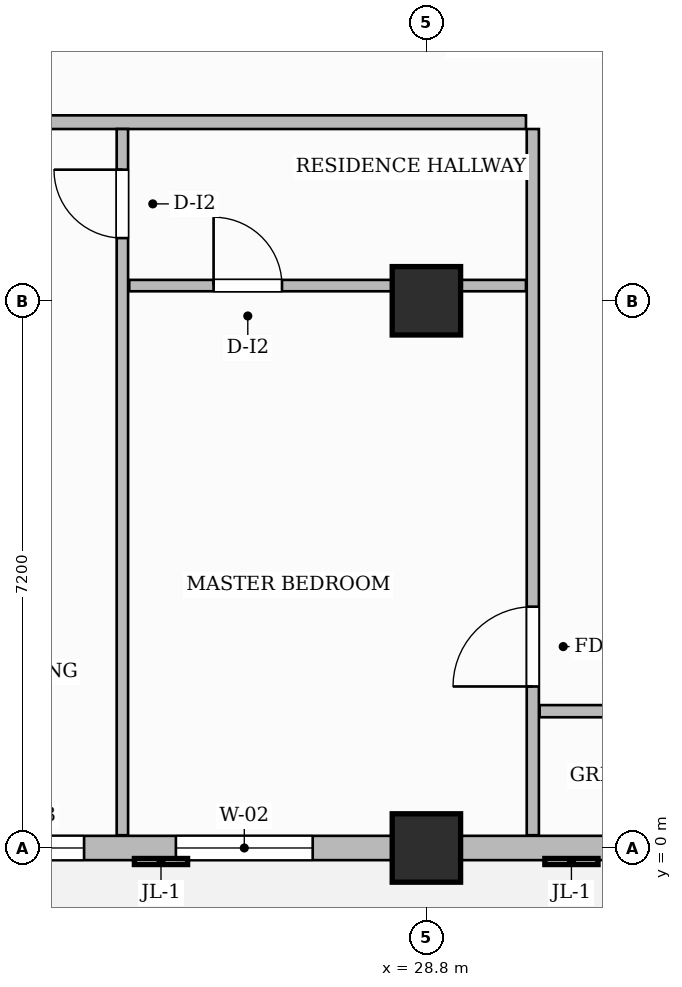
"""IFC4 building model, lengths in metres.
Left out: names, types, materials, properties, quantities, classifications, styles, units other than length and angle.
Written with IfcOpenShell. Run it as: python <this file> out.ifc"""

import sys

from ifc_helpers import new_model, si_unit, direction, frame, frame_2d, origin, origin_2d, place, context, subcontext, project, spatial, rectangle, extrude, source, transform, mapped, element, fill, save


model = new_model("IFC4")
c1 = context("Model", 3, precision=1e-05, world=origin(), true_north=direction((0.0, 1.0)))
c2 = subcontext(c1, "Body", "Model", "MODEL_VIEW")
j1 = project(units=[si_unit("LENGTHUNIT", "METRE"), si_unit("PLANEANGLEUNIT", "RADIAN")], contexts=[c1])
p1 = place(None, origin())
s1 = spatial("IfcSite", under=j1, at=p1, CompositionType="ELEMENT")
p2 = place(p1, origin())
s2 = spatial("IfcBuilding", under=s1, at=p2, CompositionType="ELEMENT")
p3 = place(p2, frame((0.0, 0.0, 248.1)))
s3 = spatial("IfcBuildingStorey", under=s2, at=p3, CompositionType="ELEMENT", Elevation=248.1)
m1 = source(origin(), c2, "Body", "SweptSolid", [
    extrude(rectangle(XDim=0.9, YDim=0.9, at=origin_2d()), origin(), (0.0, 0.0, 1.0), 3.85),
])
for number, where, z_axis, x_axis in (
    (1, (28.8, 0.0, 0.0), (0.0, 0.0, 1.0), (1.0, 0.0, 0.0)),
    (2, (28.8, 7.2, 0.0), (0.0, 0.0, 1.0), (1.0, 0.0, 0.0)),
):
    element("IfcColumn", number, at=place(p3, frame(where, z_axis=z_axis, x_axis=x_axis)), inside=s3, PredefinedType="COLUMN", context=c2, shape_type="MappedRepresentation", body=[
        mapped(m1, transform((0.0, 0.0, 0.0), scale=1.0)),
    ])
p4 = place(p3, frame((14.568, 9.55, 0.0), z_axis=(0.0, 0.0, 1.0), x_axis=(1.0, 0.0, 0.0)))
e3 = element("IfcWall", 3, at=p4, inside=s3, PredefinedType="PARTITIONING", context=c2, shape_type="SweptSolid", body=[
    extrude(rectangle(XDim=15.542, YDim=0.18, at=frame_2d((7.771, 0.0))), origin(), (0.0, 0.0, 1.0), 3.6),
])
p5 = place(p4, frame((2.888, 0.0, 0.0)))
e4 = element("IfcOpeningElement", 4, at=p5, cuts=e3, PredefinedType="OPENING", context=c2, shape_type="SweptSolid", body=[
    extrude(rectangle(XDim=1.0, YDim=2.2, at=frame_2d((0.5, 1.1))), frame((0.0, 0.1, 0.0), z_axis=(0.0, -1.0, 0.0), x_axis=(1.0, 0.0, 0.0)), (0.0, 0.0, 1.0), 0.2),
])
p6 = place(p4, frame((8.212, 0.0, 0.0)))
e5 = element("IfcOpeningElement", 5, at=p6, cuts=e3, PredefinedType="OPENING", context=c2, shape_type="SweptSolid", body=[
    extrude(rectangle(XDim=1.05, YDim=2.25, at=frame_2d((0.525, 1.125))), frame((0.0, 0.1, 0.0), z_axis=(0.0, -1.0, 0.0), x_axis=(1.0, 0.0, 0.0)), (0.0, 0.0, 1.0), 0.2),
])
p7 = place(p3, frame((30.2, 0.168, 0.0), z_axis=(0.0, 0.0, 1.0), x_axis=(0.0, 1.0, 0.0)))
e6 = element("IfcWall", 6, at=p7, inside=s3, PredefinedType="PARTITIONING", context=c2, shape_type="SweptSolid", body=[
    extrude(rectangle(XDim=9.292, YDim=0.16, at=frame_2d((4.646, 0.0))), origin(), (0.0, 0.0, 1.0), 3.6),
])
p8 = place(p7, frame((1.957, 0.0, 0.0)))
e7 = element("IfcOpeningElement", 7, at=p8, cuts=e6, PredefinedType="OPENING", context=c2, shape_type="SweptSolid", body=[
    extrude(rectangle(XDim=1.05, YDim=2.15, at=frame_2d((0.525, 1.075))), frame((0.0, 0.09, 0.0), z_axis=(0.0, -1.0, 0.0), x_axis=(1.0, 0.0, 0.0)), (0.0, 0.0, 1.0), 0.18),
])
p9 = place(p3, frame((30.29, 1.8, 0.0), z_axis=(0.0, 0.0, 1.0), x_axis=(1.0, 0.0, 0.0)))
e8 = element("IfcWall", 8, at=p9, inside=s3, PredefinedType="PARTITIONING", context=c2, shape_type="SweptSolid", body=[
    extrude(rectangle(XDim=19.37, YDim=0.16, at=frame_2d((9.685, 0.0))), origin(), (0.0, 0.0, 1.0), 3.6),
])
p10 = place(p9, frame((9.735, 0.0, 0.0)))
e9 = element("IfcOpeningElement", 9, at=p10, cuts=e8, PredefinedType="OPENING", context=c2, shape_type="SweptSolid", body=[
    extrude(rectangle(XDim=0.95, YDim=2.15, at=frame_2d((0.475, 1.075))), frame((0.0, 0.09, 0.0), z_axis=(0.0, -1.0, 0.0), x_axis=(1.0, 0.0, 0.0)), (0.0, 0.0, 1.0), 0.18),
])
p11 = place(p3, frame((24.8, 0.168, 0.0), z_axis=(0.0, 0.0, 1.0), x_axis=(0.0, 1.0, 0.0)))
e10 = element("IfcWall", 10, at=p11, inside=s3, PredefinedType="PARTITIONING", context=c2, shape_type="SweptSolid", body=[
    extrude(rectangle(XDim=9.292, YDim=0.15, at=frame_2d((4.646, 0.0))), origin(), (0.0, 0.0, 1.0), 3.6),
])
p12 = place(p11, frame((7.857, 0.0, 0.0)))
e11 = element("IfcOpeningElement", 11, at=p12, cuts=e10, PredefinedType="OPENING", context=c2, shape_type="SweptSolid", body=[
    extrude(rectangle(XDim=0.9, YDim=2.15, at=frame_2d((0.45, 1.075))), frame((0.0, 0.085, 0.0), z_axis=(0.0, -1.0, 0.0), x_axis=(1.0, 0.0, 0.0)), (0.0, 0.0, 1.0), 0.17),
])
p13 = place(p3, frame((24.89, 7.4, 0.0), z_axis=(0.0, 0.0, 1.0), x_axis=(1.0, 0.0, 0.0)))
e12 = element("IfcWall", 12, at=p13, inside=s3, PredefinedType="PARTITIONING", context=c2, shape_type="SweptSolid", body=[
    extrude(rectangle(XDim=5.22, YDim=0.15, at=frame_2d((2.61, 0.0))), origin(), (0.0, 0.0, 1.0), 3.135),
])
p14 = place(p13, frame((1.11, 0.0, 0.0)))
e13 = element("IfcOpeningElement", 13, at=p14, cuts=e12, PredefinedType="OPENING", context=c2, shape_type="SweptSolid", body=[
    extrude(rectangle(XDim=0.9, YDim=2.15, at=frame_2d((0.45, 1.075))), frame((0.0, 0.085, 0.0), z_axis=(0.0, -1.0, 0.0), x_axis=(1.0, 0.0, 0.0)), (0.0, 0.0, 1.0), 0.17),
])
p15 = place(p3, frame((14.4, 0.0, 0.0), z_axis=(0.0, 0.0, 1.0), x_axis=(1.0, 0.0, 0.0)))
e14 = element("IfcWall", 14, at=p15, inside=s3, PredefinedType="SOLIDWALL", context=c2, shape_type="SweptSolid", body=[
    extrude(rectangle(XDim=35.4, YDim=0.32, at=frame_2d((17.7, 0.0))), origin(), (0.0, 0.0, 1.0), 3.135),
])
p16 = place(p15, frame((0.85, 0.0, 0.0)))
e15 = element("IfcOpeningElement", 15, at=p16, cuts=e14, PredefinedType="OPENING", context=c2, shape_type="SweptSolid", body=[
    extrude(rectangle(XDim=1.2, YDim=2.2, at=frame_2d((0.6, 1.1))), frame((0.0, 0.17, 0.0), z_axis=(0.0, -1.0, 0.0), x_axis=(1.0, 0.0, 0.0)), (0.0, 0.0, 1.0), 0.34),
])
p17 = place(p15, frame((2.811, 0.0, 0.8)))
e16 = element("IfcOpeningElement", 16, at=p17, cuts=e14, PredefinedType="OPENING", context=c2, shape_type="SweptSolid", body=[
    extrude(rectangle(XDim=1.8, YDim=1.85, at=frame_2d((0.9, 0.925))), frame((0.0, 0.17, 0.0), z_axis=(0.0, -1.0, 0.0), x_axis=(1.0, 0.0, 0.0)), (0.0, 0.0, 1.0), 0.34),
])
p18 = place(p15, frame((5.269, 0.0, 0.8)))
e17 = element("IfcOpeningElement", 17, at=p18, cuts=e14, PredefinedType="OPENING", context=c2, shape_type="SweptSolid", body=[
    extrude(rectangle(XDim=0.95, YDim=1.75, at=frame_2d((0.475, 0.875))), frame((0.0, 0.17, 0.0), z_axis=(0.0, -1.0, 0.0), x_axis=(1.0, 0.0, 0.0)), (0.0, 0.0, 1.0), 0.34),
])
p19 = place(p15, frame((8.496, 0.0, 0.8)))
e18 = element("IfcOpeningElement", 18, at=p19, cuts=e14, PredefinedType="OPENING", context=c2, shape_type="SweptSolid", body=[
    extrude(rectangle(XDim=1.4, YDim=1.85, at=frame_2d((0.7, 0.925))), frame((0.0, 0.17, 0.0), z_axis=(0.0, -1.0, 0.0), x_axis=(1.0, 0.0, 0.0)), (0.0, 0.0, 1.0), 0.34),
])
p20 = place(p15, frame((11.104, 0.0, 0.8)))
e19 = element("IfcOpeningElement", 19, at=p20, cuts=e14, PredefinedType="OPENING", context=c2, shape_type="SweptSolid", body=[
    extrude(rectangle(XDim=1.8, YDim=1.85, at=frame_2d((0.9, 0.925))), frame((0.0, 0.17, 0.0), z_axis=(0.0, -1.0, 0.0), x_axis=(1.0, 0.0, 0.0)), (0.0, 0.0, 1.0), 0.34),
])
p21 = place(p15, frame((16.804, 0.0, 0.8)))
e20 = element("IfcOpeningElement", 20, at=p21, cuts=e14, PredefinedType="OPENING", context=c2, shape_type="SweptSolid", body=[
    extrude(rectangle(XDim=1.8, YDim=1.85, at=frame_2d((0.9, 0.925))), frame((0.0, 0.17, 0.0), z_axis=(0.0, -1.0, 0.0), x_axis=(1.0, 0.0, 0.0)), (0.0, 0.0, 1.0), 0.34),
])
p22 = place(p15, frame((21.725, 0.0, 0.8)))
e21 = element("IfcOpeningElement", 21, at=p22, cuts=e14, PredefinedType="OPENING", context=c2, shape_type="SweptSolid", body=[
    extrude(rectangle(XDim=1.8, YDim=1.85, at=frame_2d((0.9, 0.925))), frame((0.0, 0.17, 0.0), z_axis=(0.0, -1.0, 0.0), x_axis=(1.0, 0.0, 0.0)), (0.0, 0.0, 1.0), 0.34),
])
p23 = place(p15, frame((24.475, 0.0, 0.8)))
e22 = element("IfcOpeningElement", 22, at=p23, cuts=e14, PredefinedType="OPENING", context=c2, shape_type="SweptSolid", body=[
    extrude(rectangle(XDim=1.8, YDim=1.85, at=frame_2d((0.9, 0.925))), frame((0.0, 0.17, 0.0), z_axis=(0.0, -1.0, 0.0), x_axis=(1.0, 0.0, 0.0)), (0.0, 0.0, 1.0), 0.34),
])
p24 = place(p15, frame((29.075, 0.0, 0.8)))
e23 = element("IfcOpeningElement", 23, at=p24, cuts=e14, PredefinedType="OPENING", context=c2, shape_type="SweptSolid", body=[
    extrude(rectangle(XDim=1.8, YDim=1.85, at=frame_2d((0.9, 0.925))), frame((0.0, 0.17, 0.0), z_axis=(0.0, -1.0, 0.0), x_axis=(1.0, 0.0, 0.0)), (0.0, 0.0, 1.0), 0.34),
])
p25 = place(p15, frame((32.125, 0.0, 0.8)))
e24 = element("IfcOpeningElement", 24, at=p25, cuts=e14, PredefinedType="OPENING", context=c2, shape_type="SweptSolid", body=[
    extrude(rectangle(XDim=1.8, YDim=1.85, at=frame_2d((0.9, 0.925))), frame((0.0, 0.17, 0.0), z_axis=(0.0, -1.0, 0.0), x_axis=(1.0, 0.0, 0.0)), (0.0, 0.0, 1.0), 0.34),
])
m2 = source(origin(), c2, "Body", "SweptSolid", [
    extrude(rectangle(XDim=1.05, YDim=2.15, at=frame_2d((0.525, 1.075))), frame((0.0, 0.025, 0.0), z_axis=(0.0, -1.0, 0.0), x_axis=(1.0, 0.0, 0.0)), (0.0, 0.0, 1.0), 0.05),
])
p26 = place(p8, origin())
e25 = element("IfcDoor", 25, at=p26, inside=s3, OperationType="SINGLE_SWING_LEFT", PredefinedType="DOOR", context=c2, shape_type="MappedRepresentation", body=[
    mapped(m2, transform((0.0, 0.0, 0.0), scale=1.0)),
])
fill(e7, e25)
m3 = source(origin(), c2, "Body", "SweptSolid", [
    extrude(rectangle(XDim=0.9, YDim=2.15, at=frame_2d((0.45, 1.075))), frame((0.0, 0.025, 0.0), z_axis=(0.0, -1.0, 0.0), x_axis=(1.0, 0.0, 0.0)), (0.0, 0.0, 1.0), 0.05),
])
p27 = place(p12, origin())
e26 = element("IfcDoor", 26, at=p27, inside=s3, OperationType="SINGLE_SWING_RIGHT", PredefinedType="DOOR", context=c2, shape_type="MappedRepresentation", body=[
    mapped(m3, transform((0.0, 0.0, 0.0), scale=1.0)),
])
fill(e11, e26)
p28 = place(p14, origin())
e27 = element("IfcDoor", 27, at=p28, inside=s3, OperationType="SINGLE_SWING_LEFT", PredefinedType="DOOR", context=c2, shape_type="MappedRepresentation", body=[
    mapped(m3, transform((0.0, 0.0, 0.0), scale=1.0)),
])
fill(e13, e27)
m4 = source(origin(), c2, "Body", "SweptSolid", [
    extrude(rectangle(XDim=1.4, YDim=1.85, at=frame_2d((0.7, 0.925))), frame((0.0, 0.03, 0.0), z_axis=(0.0, -1.0, 0.0), x_axis=(1.0, 0.0, 0.0)), (0.0, 0.0, 1.0), 0.06),
])
p29 = place(p19, origin())
e28 = element("IfcWindow", 28, at=p29, inside=s3, PartitioningType="SINGLE_PANEL", PredefinedType="WINDOW", context=c2, shape_type="MappedRepresentation", body=[
    mapped(m4, transform((0.0, 0.0, 0.0), scale=1.0)),
])
fill(e18, e28)
m5 = source(origin(), c2, "Body", "SweptSolid", [
    extrude(rectangle(XDim=1.8, YDim=1.85, at=frame_2d((0.9, 0.925))), frame((0.0, 0.03, 0.0), z_axis=(0.0, -1.0, 0.0), x_axis=(1.0, 0.0, 0.0)), (0.0, 0.0, 1.0), 0.06),
])
p30 = place(p20, origin())
e29 = element("IfcWindow", 29, at=p30, inside=s3, PartitioningType="DOUBLE_PANEL_VERTICAL", PredefinedType="WINDOW", context=c2, shape_type="MappedRepresentation", body=[
    mapped(m5, transform((0.0, 0.0, 0.0), scale=1.0)),
])
fill(e19, e29)
save(model, sys.argv[1])
